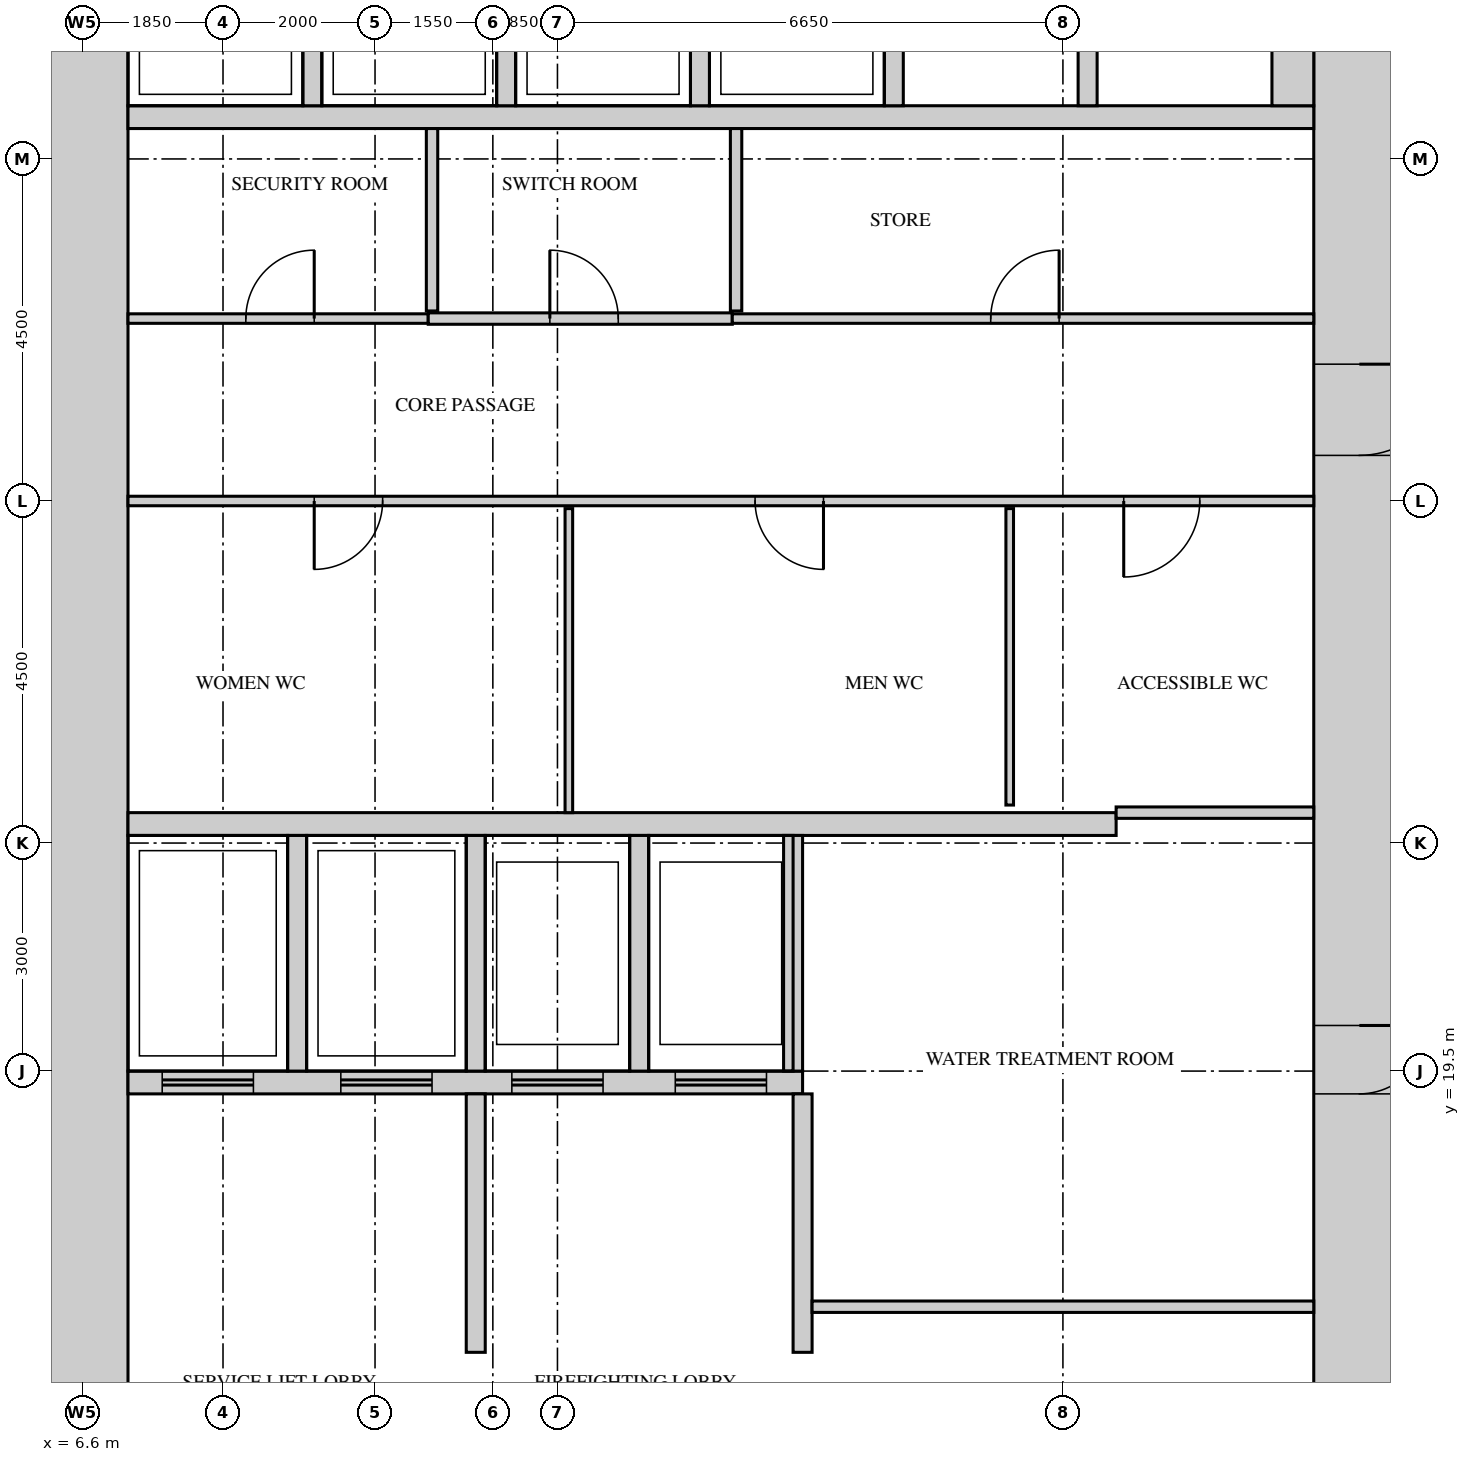
"""IFC4 building model, lengths in metres.
Left out: names, types, materials, properties, quantities, classifications, styles, units other than length and angle.
Written with IfcOpenShell. Run it as: python <this file> out.ifc"""

import sys

from ifc_helpers import new_model, si_unit, direction, frame, frame_2d, origin, place, context, subcontext, project, spatial, rectangle, extrude, source, transform, mapped, element, fill, save


model = new_model("IFC4")
c1 = context("Model", 3, precision=1e-05, world=origin(), true_north=direction((0.0, 1.0)))
c2 = subcontext(c1, "Body", "Model", "MODEL_VIEW")
j1 = project(units=[si_unit("LENGTHUNIT", "METRE"), si_unit("PLANEANGLEUNIT", "RADIAN")], contexts=[c1])
p1 = place(None, origin())
s1 = spatial("IfcSite", under=j1, at=p1, CompositionType="ELEMENT")
p2 = place(p1, origin())
s2 = spatial("IfcBuilding", under=s1, at=p2, CompositionType="ELEMENT")
p3 = place(p2, frame((0.0, 0.0, 82.5)))
s3 = spatial("IfcBuildingStorey", under=s2, at=p3, CompositionType="ELEMENT", Elevation=82.5)
m1 = source(origin(), c2, "Body", "SweptSolid", [
    extrude(rectangle(XDim=27.6, YDim=1.2, at=frame_2d((13.8, 0.0))), origin(), (0.0, 0.0, 1.0), 4.2),
])
p4 = place(p3, frame((23.4, 13.2, 0.0), z_axis=(0.0, 0.0, 1.0), x_axis=(0.0, 1.0, 0.0)))
e1 = element("IfcWall", 1, at=p4, inside=s3, PredefinedType="SHEAR", context=c2, shape_type="MappedRepresentation", body=[
    mapped(m1, transform((0.0, 0.0, 0.0))),
])
m2 = source(origin(), c2, "Body", "SweptSolid", [
    extrude(rectangle(XDim=1.8, YDim=2.1, at=frame_2d((0.9, 1.05))), frame((0.0, 0.61, 0.0), z_axis=(0.0, -1.0, 0.0), x_axis=(1.0, 0.0, 0.0)), (0.0, 0.0, 1.0), 1.22),
])
p5 = place(p4, frame((22.4, 0.0, 0.0)))
e2 = element("IfcOpeningElement", 2, at=p5, cuts=e1, PredefinedType="OPENING", context=c2, shape_type="MappedRepresentation", body=[
    mapped(m2, transform((0.0, 0.0, 0.0))),
])
m3 = source(origin(), c2, "Body", "SweptSolid", [
    extrude(rectangle(XDim=1.2, YDim=2.1, at=frame_2d((0.6, 1.05))), frame((0.0, 0.61, 0.0), z_axis=(0.0, -1.0, 0.0), x_axis=(1.0, 0.0, 0.0)), (0.0, 0.0, 1.0), 1.22),
])
p6 = place(p4, frame((14.4, 0.0, 0.0)))
e3 = element("IfcOpeningElement", 3, at=p6, cuts=e1, PredefinedType="OPENING", context=c2, shape_type="MappedRepresentation", body=[
    mapped(m3, transform((0.0, 0.0, 0.0))),
])
m4 = source(origin(), c2, "Body", "SweptSolid", [
    extrude(rectangle(XDim=0.9, YDim=2.1, at=frame_2d((0.45, 1.05))), frame((0.0, 0.61, 0.0), z_axis=(0.0, -1.0, 0.0), x_axis=(1.0, 0.0, 0.0)), (0.0, 0.0, 1.0), 1.22),
])
p7 = place(p4, frame((1.15, 0.0, 0.0)))
e4 = element("IfcOpeningElement", 4, at=p7, cuts=e1, PredefinedType="OPENING", context=c2, shape_type="MappedRepresentation", body=[
    mapped(m4, transform((0.0, 0.0, 0.0))),
])
p8 = place(p4, frame((6.0, 0.0, 0.0)))
e5 = element("IfcOpeningElement", 5, at=p8, cuts=e1, PredefinedType="OPENING", context=c2, shape_type="MappedRepresentation", body=[
    mapped(m4, transform((0.0, 0.0, 0.0))),
])
p9 = place(p3, frame((6.6, 13.2, 0.0), z_axis=(0.0, 0.0, 1.0), x_axis=(0.0, 1.0, 0.0)))
e6 = element("IfcWall", 6, at=p9, inside=s3, PredefinedType="SHEAR", context=c2, shape_type="MappedRepresentation", body=[
    mapped(m1, transform((0.0, 0.0, 0.0))),
])
m5 = source(origin(), c2, "Body", "SweptSolid", [
    extrude(rectangle(XDim=13.0, YDim=0.3, at=frame_2d((6.5, 0.0))), origin(), (0.0, 0.0, 1.0), 4.2),
])
p10 = place(p3, frame((7.2, 22.75, 0.0), z_axis=(0.0, 0.0, 1.0), x_axis=(1.0, 0.0, 0.0)))
e7 = element("IfcWall", 7, at=p10, inside=s3, PredefinedType="STANDARD", context=c2, shape_type="MappedRepresentation", body=[
    mapped(m5, transform((0.0, 0.0, 0.0))),
])
m6 = source(origin(), c2, "Body", "SweptSolid", [
    extrude(rectangle(XDim=8.875, YDim=0.3, at=frame_2d((4.438, 0.0))), origin(), (0.0, 0.0, 1.0), 4.2),
])
p11 = place(p3, frame((7.2, 19.35, 0.0), z_axis=(0.0, 0.0, 1.0), x_axis=(1.0, 0.0, 0.0)))
e8 = element("IfcWall", 8, at=p11, inside=s3, PredefinedType="STANDARD", context=c2, shape_type="MappedRepresentation", body=[
    mapped(m6, transform((0.0, 0.0, 0.0))),
])
m7 = source(origin(), c2, "Body", "SweptSolid", [
    extrude(rectangle(XDim=1.2, YDim=2.1, at=frame_2d((0.6, 1.05))), frame((0.0, 0.16, 0.0), z_axis=(0.0, -1.0, 0.0), x_axis=(1.0, 0.0, 0.0)), (0.0, 0.0, 1.0), 0.32),
])
p12 = place(p11, frame((0.45, 0.0, 0.0)))
e9 = element("IfcOpeningElement", 9, at=p12, cuts=e8, PredefinedType="OPENING", context=c2, shape_type="MappedRepresentation", body=[
    mapped(m7, transform((0.0, 0.0, 0.0))),
])
p13 = place(p11, frame((2.8, 0.0, 0.0)))
e10 = element("IfcOpeningElement", 10, at=p13, cuts=e8, PredefinedType="OPENING", context=c2, shape_type="MappedRepresentation", body=[
    mapped(m7, transform((0.0, 0.0, 0.0))),
])
p14 = place(p11, frame((5.05, 0.0, 0.0)))
e11 = element("IfcOpeningElement", 11, at=p14, cuts=e8, PredefinedType="OPENING", context=c2, shape_type="MappedRepresentation", body=[
    mapped(m7, transform((0.0, 0.0, 0.0))),
])
p15 = place(p11, frame((7.2, 0.0, 0.0)))
e12 = element("IfcOpeningElement", 12, at=p15, cuts=e8, PredefinedType="OPENING", context=c2, shape_type="MappedRepresentation", body=[
    mapped(m7, transform((0.0, 0.0, 0.0))),
])
m8 = source(origin(), c2, "Body", "SweptSolid", [
    extrude(rectangle(XDim=15.6, YDim=0.3, at=frame_2d((7.8, 0.0))), origin(), (0.0, 0.0, 1.0), 4.2),
])
p16 = place(p3, frame((7.2, 32.05, 0.0), z_axis=(0.0, 0.0, 1.0), x_axis=(1.0, 0.0, 0.0)))
e13 = element("IfcWall", 13, at=p16, inside=s3, PredefinedType="STANDARD", context=c2, shape_type="MappedRepresentation", body=[
    mapped(m8, transform((0.0, 0.0, 0.0))),
])
m9 = source(origin(), c2, "Body", "SweptSolid", [
    extrude(rectangle(XDim=3.1, YDim=0.25, at=frame_2d((1.55, 0.0))), origin(), (0.0, 0.0, 1.0), 4.2),
])
for number, where, z_axis, x_axis in (
    (14, (9.425, 19.5, 0.0), (0.0, 0.0, 1.0), (0.0, 1.0, 0.0)),
    (15, (11.775, 19.5, 0.0), (0.0, 0.0, 1.0), (0.0, 1.0, 0.0)),
    (16, (13.925, 19.5, 0.0), (0.0, 0.0, 1.0), (0.0, 1.0, 0.0)),
    (17, (15.95, 19.5, 0.0), (0.0, 0.0, 1.0), (0.0, 1.0, 0.0)),
):
    element("IfcWall", number, at=place(p3, frame(where, z_axis=z_axis, x_axis=x_axis)), inside=s3, PredefinedType="STANDARD", context=c2, shape_type="MappedRepresentation", body=[
        mapped(m9, transform((0.0, 0.0, 0.0))),
    ])
m10 = source(origin(), c2, "Body", "SweptSolid", [
    extrude(rectangle(XDim=2.4, YDim=0.25, at=frame_2d((1.2, 0.0))), origin(), (0.0, 0.0, 1.0), 4.2),
])
for number, where, z_axis, x_axis in (
    (18, (9.625, 32.2, 0.0), (0.0, 0.0, 1.0), (0.0, 1.0, 0.0)),
    (19, (12.175, 32.2, 0.0), (0.0, 0.0, 1.0), (0.0, 1.0, 0.0)),
    (20, (14.725, 32.2, 0.0), (0.0, 0.0, 1.0), (0.0, 1.0, 0.0)),
    (21, (17.275, 32.2, 0.0), (0.0, 0.0, 1.0), (0.0, 1.0, 0.0)),
    (22, (19.825, 32.2, 0.0), (0.0, 0.0, 1.0), (0.0, 1.0, 0.0)),
):
    element("IfcWall", number, at=place(p3, frame(where, z_axis=z_axis, x_axis=x_axis)), inside=s3, PredefinedType="STANDARD", context=c2, shape_type="MappedRepresentation", body=[
        mapped(m10, transform((0.0, 0.0, 0.0))),
    ])
m11 = source(origin(), c2, "Body", "SweptSolid", [
    extrude(rectangle(XDim=2.4, YDim=0.55, at=frame_2d((1.2, 0.0))), origin(), (0.0, 0.0, 1.0), 4.2),
])
p17 = place(p3, frame((22.525, 32.2, 0.0), z_axis=(0.0, 0.0, 1.0), x_axis=(0.0, 1.0, 0.0)))
e23 = element("IfcWall", 23, at=p17, inside=s3, PredefinedType="STANDARD", context=c2, shape_type="MappedRepresentation", body=[
    mapped(m11, transform((0.0, 0.0, 0.0))),
])
m12 = source(origin(), c2, "Body", "SweptSolid", [
    extrude(rectangle(XDim=3.4, YDim=0.25, at=frame_2d((1.7, 0.0))), origin(), (0.0, 0.0, 1.0), 4.2),
])
for number, where, z_axis, x_axis in (
    (24, (16.075, 15.8, 0.0), (0.0, 0.0, 1.0), (0.0, 1.0, 0.0)),
    (25, (11.775, 15.8, 0.0), (0.0, 0.0, 1.0), (0.0, 1.0, 0.0)),
):
    element("IfcWall", number, at=place(p3, frame(where, z_axis=z_axis, x_axis=x_axis)), inside=s3, PredefinedType="STANDARD", context=c2, shape_type="MappedRepresentation", body=[
        mapped(m12, transform((0.0, 0.0, 0.0))),
    ])
m13 = source(origin(), c2, "Body", "SweptSolid", [
    extrude(rectangle(XDim=6.6, YDim=0.15, at=frame_2d((3.3, 0.0))), origin(), (0.0, 0.0, 1.0), 4.3),
])
p18 = place(p3, frame((16.2, 16.4, 0.0), z_axis=(0.0, 0.0, 1.0), x_axis=(1.0, 0.0, 0.0)))
e26 = element("IfcWall", 26, at=p18, inside=s3, PredefinedType="PARTITIONING", context=c2, shape_type="MappedRepresentation", body=[
    mapped(m13, transform((0.0, 0.0, 0.0))),
])
m14 = source(origin(), c2, "Body", "SweptSolid", [
    extrude(rectangle(XDim=4.0, YDim=0.1, at=frame_2d((2.0, 0.0))), origin(), (0.0, 0.0, 1.0), 4.3),
])
p19 = place(p3, frame((13.0, 22.9, 0.0), z_axis=(0.0, 0.0, 1.0), x_axis=(0.0, 1.0, 0.0)))
e27 = element("IfcWall", 27, at=p19, inside=s3, PredefinedType="PARTITIONING", context=c2, shape_type="MappedRepresentation", body=[
    mapped(m14, transform((0.0, 0.0, 0.0))),
])
m15 = source(origin(), c2, "Body", "SweptSolid", [
    extrude(rectangle(XDim=2.6, YDim=0.15, at=frame_2d((1.3, 0.0))), origin(), (0.0, 0.0, 1.0), 4.3),
])
p20 = place(p3, frame((20.2, 22.9, 0.0), z_axis=(0.0, 0.0, 1.0), x_axis=(1.0, 0.0, 0.0)))
e28 = element("IfcWall", 28, at=p20, inside=s3, PredefinedType="PARTITIONING", context=c2, shape_type="MappedRepresentation", body=[
    mapped(m15, transform((0.0, 0.0, 0.0))),
])
m16 = source(origin(), c2, "Body", "SweptSolid", [
    extrude(rectangle(XDim=3.9, YDim=0.1, at=frame_2d((1.95, 0.0))), origin(), (0.0, 0.0, 1.0), 4.3),
])
p21 = place(p3, frame((18.8, 23.0, 0.0), z_axis=(0.0, 0.0, 1.0), x_axis=(0.0, 1.0, 0.0)))
e29 = element("IfcWall", 29, at=p21, inside=s3, PredefinedType="PARTITIONING", context=c2, shape_type="MappedRepresentation", body=[
    mapped(m16, transform((0.0, 0.0, 0.0))),
])
m17 = source(origin(), c2, "Body", "SweptSolid", [
    extrude(rectangle(XDim=15.6, YDim=0.125, at=frame_2d((7.8, 0.0))), origin(), (0.0, 0.0, 1.0), 4.3),
])
p22 = place(p3, frame((7.2, 27.0, 0.0), z_axis=(0.0, 0.0, 1.0), x_axis=(1.0, 0.0, 0.0)))
e30 = element("IfcWall", 30, at=p22, inside=s3, PredefinedType="PARTITIONING", context=c2, shape_type="MappedRepresentation", body=[
    mapped(m17, transform((0.0, 0.0, 0.0))),
])
m18 = source(origin(), c2, "Body", "SweptSolid", [
    extrude(rectangle(XDim=0.9, YDim=2.1, at=frame_2d((0.45, 1.05))), frame((0.0, 0.073, 0.0), z_axis=(0.0, -1.0, 0.0), x_axis=(1.0, 0.0, 0.0)), (0.0, 0.0, 1.0), 0.145),
])
p23 = place(p22, frame((2.45, 0.0, 0.0)))
e31 = element("IfcOpeningElement", 31, at=p23, cuts=e30, PredefinedType="OPENING", context=c2, shape_type="MappedRepresentation", body=[
    mapped(m18, transform((0.0, 0.0, 0.0))),
])
p24 = place(p22, frame((8.25, 0.0, 0.0)))
e32 = element("IfcOpeningElement", 32, at=p24, cuts=e30, PredefinedType="OPENING", context=c2, shape_type="MappedRepresentation", body=[
    mapped(m18, transform((0.0, 0.0, 0.0))),
])
m19 = source(origin(), c2, "Body", "SweptSolid", [
    extrude(rectangle(XDim=1.0, YDim=2.1, at=frame_2d((0.5, 1.05))), frame((0.0, 0.073, 0.0), z_axis=(0.0, -1.0, 0.0), x_axis=(1.0, 0.0, 0.0)), (0.0, 0.0, 1.0), 0.145),
])
p25 = place(p22, frame((13.1, 0.0, 0.0)))
e33 = element("IfcOpeningElement", 33, at=p25, cuts=e30, PredefinedType="OPENING", context=c2, shape_type="MappedRepresentation", body=[
    mapped(m19, transform((0.0, 0.0, 0.0))),
])
m20 = source(origin(), c2, "Body", "SweptSolid", [
    extrude(rectangle(XDim=3.95, YDim=0.125, at=frame_2d((1.975, 0.0))), origin(), (0.0, 0.0, 1.0), 4.3),
])
p26 = place(p3, frame((7.2, 29.4, 0.0), z_axis=(0.0, 0.0, 1.0), x_axis=(1.0, 0.0, 0.0)))
e34 = element("IfcWall", 34, at=p26, inside=s3, PredefinedType="PARTITIONING", context=c2, shape_type="MappedRepresentation", body=[
    mapped(m20, transform((0.0, 0.0, 0.0))),
])
p27 = place(p26, frame((1.55, 0.0, 0.0)))
e35 = element("IfcOpeningElement", 35, at=p27, cuts=e34, PredefinedType="OPENING", context=c2, shape_type="MappedRepresentation", body=[
    mapped(m18, transform((0.0, 0.0, 0.0))),
])
m21 = source(origin(), c2, "Body", "SweptSolid", [
    extrude(rectangle(XDim=4.0, YDim=0.15, at=frame_2d((2.0, 0.0))), origin(), (0.0, 0.0, 1.0), 4.3),
])
p28 = place(p3, frame((11.15, 29.4, 0.0), z_axis=(0.0, 0.0, 1.0), x_axis=(1.0, 0.0, 0.0)))
e36 = element("IfcWall", 36, at=p28, inside=s3, PredefinedType="PARTITIONING", context=c2, shape_type="MappedRepresentation", body=[
    mapped(m21, transform((0.0, 0.0, 0.0))),
])
m22 = source(origin(), c2, "Body", "SweptSolid", [
    extrude(rectangle(XDim=0.9, YDim=2.1, at=frame_2d((0.45, 1.05))), frame((0.0, 0.085, 0.0), z_axis=(0.0, -1.0, 0.0), x_axis=(1.0, 0.0, 0.0)), (0.0, 0.0, 1.0), 0.17),
])
p29 = place(p28, frame((1.6, 0.0, 0.0)))
e37 = element("IfcOpeningElement", 37, at=p29, cuts=e36, PredefinedType="OPENING", context=c2, shape_type="MappedRepresentation", body=[
    mapped(m22, transform((0.0, 0.0, 0.0))),
])
m23 = source(origin(), c2, "Body", "SweptSolid", [
    extrude(rectangle(XDim=7.65, YDim=0.125, at=frame_2d((3.825, 0.0))), origin(), (0.0, 0.0, 1.0), 4.3),
])
p30 = place(p3, frame((15.15, 29.4, 0.0), z_axis=(0.0, 0.0, 1.0), x_axis=(1.0, 0.0, 0.0)))
e38 = element("IfcWall", 38, at=p30, inside=s3, PredefinedType="PARTITIONING", context=c2, shape_type="MappedRepresentation", body=[
    mapped(m23, transform((0.0, 0.0, 0.0))),
])
p31 = place(p30, frame((3.4, 0.0, 0.0)))
e39 = element("IfcOpeningElement", 39, at=p31, cuts=e38, PredefinedType="OPENING", context=c2, shape_type="MappedRepresentation", body=[
    mapped(m18, transform((0.0, 0.0, 0.0))),
])
m24 = source(origin(), c2, "Body", "SweptSolid", [
    extrude(rectangle(XDim=2.4, YDim=0.15, at=frame_2d((1.2, 0.0))), origin(), (0.0, 0.0, 1.0), 4.3),
])
for number, where, z_axis, x_axis in (
    (40, (11.2, 29.5, 0.0), (0.0, 0.0, 1.0), (0.0, 1.0, 0.0)),
    (41, (15.2, 29.5, 0.0), (0.0, 0.0, 1.0), (0.0, 1.0, 0.0)),
):
    element("IfcWall", number, at=place(p3, frame(where, z_axis=z_axis, x_axis=x_axis)), inside=s3, PredefinedType="PARTITIONING", context=c2, shape_type="MappedRepresentation", body=[
        mapped(m24, transform((0.0, 0.0, 0.0))),
    ])
m25 = source(origin(), c2, "Body", "SweptSolid", [
    extrude(rectangle(XDim=1.2, YDim=2.1, at=frame_2d((0.6, 1.05))), frame((0.0, 0.55, 0.0), z_axis=(0.0, -1.0, 0.0), x_axis=(1.0, 0.0, 0.0)), (0.0, 0.0, 1.0), 1.1),
])
p32 = place(p6, origin())
e42 = element("IfcDoor", 42, at=p32, inside=s3, OperationType="SINGLE_SWING_RIGHT", PredefinedType="DOOR", context=c2, shape_type="MappedRepresentation", body=[
    mapped(m25, transform((0.0, 0.0, 0.0))),
])
fill(e3, e42)
m26 = source(origin(), c2, "Body", "SweptSolid", [
    extrude(rectangle(XDim=0.9, YDim=2.1, at=frame_2d((0.45, 1.05))), frame((0.0, 0.025, 0.0), z_axis=(0.0, -1.0, 0.0), x_axis=(1.0, 0.0, 0.0)), (0.0, 0.0, 1.0), 0.05),
])
p33 = place(p27, origin())
e43 = element("IfcDoor", 43, at=p33, inside=s3, OperationType="SINGLE_SWING_LEFT", PredefinedType="DOOR", context=c2, shape_type="MappedRepresentation", body=[
    mapped(m26, transform((0.0, 0.0, 0.0))),
])
fill(e35, e43)
p34 = place(p29, origin())
e44 = element("IfcDoor", 44, at=p34, inside=s3, OperationType="SINGLE_SWING_RIGHT", PredefinedType="DOOR", context=c2, shape_type="MappedRepresentation", body=[
    mapped(m26, transform((0.0, 0.0, 0.0))),
])
fill(e37, e44)
p35 = place(p31, origin())
e45 = element("IfcDoor", 45, at=p35, inside=s3, OperationType="SINGLE_SWING_LEFT", PredefinedType="DOOR", context=c2, shape_type="MappedRepresentation", body=[
    mapped(m26, transform((0.0, 0.0, 0.0))),
])
fill(e39, e45)
p36 = place(p23, origin())
e46 = element("IfcDoor", 46, at=p36, inside=s3, OperationType="SINGLE_SWING_LEFT", PredefinedType="DOOR", context=c2, shape_type="MappedRepresentation", body=[
    mapped(m26, transform((0.0, 0.0, 0.0))),
])
fill(e31, e46)
p37 = place(p24, origin())
e47 = element("IfcDoor", 47, at=p37, inside=s3, OperationType="SINGLE_SWING_RIGHT", PredefinedType="DOOR", context=c2, shape_type="MappedRepresentation", body=[
    mapped(m26, transform((0.0, 0.0, 0.0))),
])
fill(e32, e47)
m27 = source(origin(), c2, "Body", "SweptSolid", [
    extrude(rectangle(XDim=1.0, YDim=2.1, at=frame_2d((0.5, 1.05))), frame((0.0, 0.025, 0.0), z_axis=(0.0, -1.0, 0.0), x_axis=(1.0, 0.0, 0.0)), (0.0, 0.0, 1.0), 0.05),
])
p38 = place(p25, origin())
e48 = element("IfcDoor", 48, at=p38, inside=s3, OperationType="SINGLE_SWING_LEFT", PredefinedType="DOOR", context=c2, shape_type="MappedRepresentation", body=[
    mapped(m27, transform((0.0, 0.0, 0.0))),
])
fill(e33, e48)
m28 = source(origin(), c2, "Body", "SweptSolid", [
    extrude(rectangle(XDim=0.9, YDim=2.1, at=frame_2d((0.45, 1.05))), frame((0.0, 0.55, 0.0), z_axis=(0.0, -1.0, 0.0), x_axis=(1.0, 0.0, 0.0)), (0.0, 0.0, 1.0), 1.1),
])
p39 = place(p8, origin())
e49 = element("IfcDoor", 49, at=p39, inside=s3, OperationType="SINGLE_SWING_RIGHT", PredefinedType="DOOR", context=c2, shape_type="MappedRepresentation", body=[
    mapped(m28, transform((0.0, 0.0, 0.0))),
])
fill(e5, e49)
m29 = source(origin(), c2, "Body", "SweptSolid", [
    extrude(rectangle(XDim=1.2, YDim=2.1, at=frame_2d((0.6, 1.05))), frame((0.0, 0.025, 0.0), z_axis=(0.0, -1.0, 0.0), x_axis=(1.0, 0.0, 0.0)), (0.0, 0.0, 1.0), 0.05),
])
p40 = place(p12, origin())
e50 = element("IfcDoor", 50, at=p40, inside=s3, OperationType="DOUBLE_DOOR_SLIDING", PredefinedType="DOOR", context=c2, shape_type="MappedRepresentation", body=[
    mapped(m29, transform((0.0, 0.0, 0.0))),
])
fill(e9, e50)
p41 = place(p13, origin())
e51 = element("IfcDoor", 51, at=p41, inside=s3, OperationType="DOUBLE_DOOR_SLIDING", PredefinedType="DOOR", context=c2, shape_type="MappedRepresentation", body=[
    mapped(m29, transform((0.0, 0.0, 0.0))),
])
fill(e10, e51)
p42 = place(p14, origin())
e52 = element("IfcDoor", 52, at=p42, inside=s3, OperationType="DOUBLE_DOOR_SLIDING", PredefinedType="DOOR", context=c2, shape_type="MappedRepresentation", body=[
    mapped(m29, transform((0.0, 0.0, 0.0))),
])
fill(e11, e52)
p43 = place(p15, origin())
e53 = element("IfcDoor", 53, at=p43, inside=s3, OperationType="DOUBLE_DOOR_SLIDING", PredefinedType="DOOR", context=c2, shape_type="MappedRepresentation", body=[
    mapped(m29, transform((0.0, 0.0, 0.0))),
])
fill(e12, e53)
save(model, sys.argv[1])
